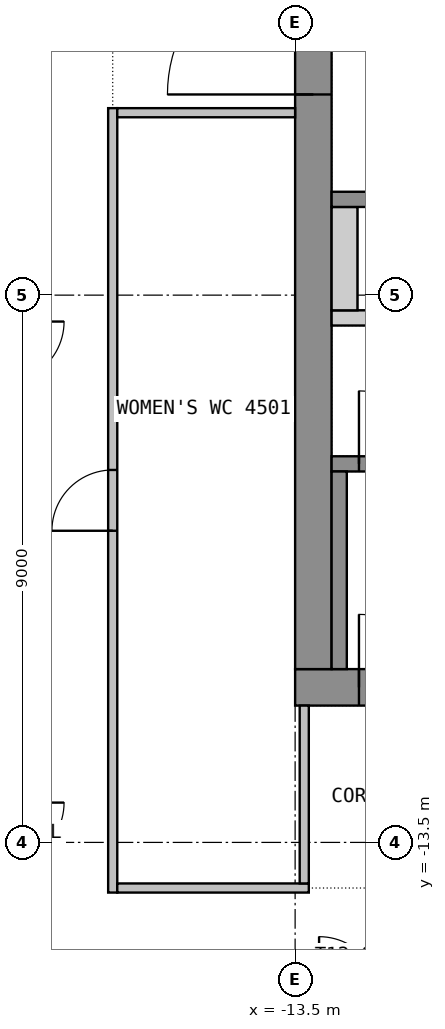
"""IFC4 building model, lengths in metres.
Left out: names, types, materials, properties, quantities, classifications, styles, units other than length and angle.
Written with IfcOpenShell. Run it as: python <this file> out.ifc"""

import sys

from ifc_helpers import new_model, si_unit, direction, frame, frame_2d, origin, place, context, subcontext, project, spatial, polyline, rectangle, outline, extrude, element, fill, save


model = new_model("IFC4")
c1 = context("Model", 3, precision=1e-05, world=origin(), true_north=direction((0.0, 1.0)))
c2 = subcontext(c1, "Body", "Model", "MODEL_VIEW")
j1 = project(units=[si_unit("LENGTHUNIT", "METRE"), si_unit("PLANEANGLEUNIT", "RADIAN")], contexts=[c1])
p1 = place(None, origin())
s1 = spatial("IfcSite", under=j1, at=p1, CompositionType="ELEMENT")
p2 = place(p1, origin())
s2 = spatial("IfcBuilding", under=s1, at=p2, CompositionType="ELEMENT")
p3 = place(p2, frame((0.0, 0.0, 183.9)))
s3 = spatial("IfcBuildingStorey", under=s2, at=p3, CompositionType="ELEMENT", Elevation=183.9)
p4 = place(p3, frame((-13.5, -10.95, 0.0), z_axis=(0.0, 0.0, 1.0), x_axis=(1.0, 0.0, 0.0)))
e1 = element("IfcWall", 1, at=p4, inside=s3, PredefinedType="SHEAR", context=c2, shape_type="SweptSolid", body=[
    extrude(rectangle(XDim=27.0, YDim=0.6, at=frame_2d((13.5, 0.0))), origin(), (0.0, 0.0, 1.0), 3.55),
])
p5 = place(p4, frame((12.3, 0.0, 0.0)))
e2 = element("IfcOpeningElement", 2, at=p5, cuts=e1, PredefinedType="OPENING", context=c2, shape_type="SweptSolid", body=[
    extrude(rectangle(XDim=2.4, YDim=2.1, at=frame_2d((1.2, 1.05))), frame((0.0, 0.31, 0.0), z_axis=(0.0, -1.0, 0.0), x_axis=(1.0, 0.0, 0.0)), (0.0, 0.0, 1.0), 0.62),
])
p6 = place(p4, frame((1.05, 0.0, 0.0)))
e3 = element("IfcOpeningElement", 3, at=p6, cuts=e1, PredefinedType="OPENING", context=c2, shape_type="SweptSolid", body=[
    extrude(rectangle(XDim=1.2, YDim=2.1, at=frame_2d((0.6, 1.05))), frame((0.0, 0.31, 0.0), z_axis=(0.0, -1.0, 0.0), x_axis=(1.0, 0.0, 0.0)), (0.0, 0.0, 1.0), 0.62),
])
p7 = place(p4, frame((24.75, 0.0, 0.0)))
e4 = element("IfcOpeningElement", 4, at=p7, cuts=e1, PredefinedType="OPENING", context=c2, shape_type="SweptSolid", body=[
    extrude(rectangle(XDim=1.2, YDim=2.1, at=frame_2d((0.6, 1.05))), frame((0.0, 0.31, 0.0), z_axis=(0.0, -1.0, 0.0), x_axis=(1.0, 0.0, 0.0)), (0.0, 0.0, 1.0), 0.62),
])
p8 = place(p3, frame((-13.2, -10.65, 0.0), z_axis=(0.0, 0.0, 1.0), x_axis=(0.0, 1.0, 0.0)))
e5 = element("IfcWall", 5, at=p8, inside=s3, PredefinedType="SHEAR", context=c2, shape_type="SweptSolid", body=[
    extrude(rectangle(XDim=21.3, YDim=0.6, at=frame_2d((10.65, 0.0))), origin(), (0.0, 0.0, 1.0), 3.55),
])
p9 = place(p8, frame((9.45, 0.0, 0.0)))
e6 = element("IfcOpeningElement", 6, at=p9, cuts=e5, PredefinedType="OPENING", context=c2, shape_type="SweptSolid", body=[
    extrude(rectangle(XDim=2.4, YDim=2.1, at=frame_2d((1.2, 1.05))), frame((0.0, 0.31, 0.0), z_axis=(0.0, -1.0, 0.0), x_axis=(1.0, 0.0, 0.0)), (0.0, 0.0, 1.0), 0.62),
])
p10 = place(p3, origin())
e7 = element("IfcWall", 7, at=p10, inside=s3, PredefinedType="SHEAR", context=c2, shape_type="SweptSolid", body=[
    extrude(outline(polyline([(-12.9, -5.0), (-4.075, -5.0), (-4.075, -4.75), (-12.9, -4.75), (-12.9, -5.0)])), origin(), (0.0, 0.0, 1.0), 3.55),
])
p11 = place(p3, origin())
e8 = element("IfcWall", 8, at=p11, inside=s3, PredefinedType="SHEAR", context=c2, shape_type="SweptSolid", body=[
    extrude(outline(polyline([(-12.9, -4.75), (-12.475, -4.75), (-12.475, -3.05), (-12.9, -3.05), (-12.9, -4.75)])), origin(), (0.0, 0.0, 1.0), 3.55),
])
p12 = place(p3, frame((-12.9, -2.925, 0.0), z_axis=(0.0, 0.0, 1.0), x_axis=(1.0, 0.0, 0.0)))
e9 = element("IfcWall", 9, at=p12, inside=s3, PredefinedType="SHEAR", context=c2, shape_type="SweptSolid", body=[
    extrude(rectangle(XDim=8.825, YDim=0.25, at=frame_2d((4.413, 0.0))), origin(), (0.0, 0.0, 1.0), 3.55),
])
p13 = place(p12, frame((1.1, 0.0, 0.0)))
e10 = element("IfcOpeningElement", 10, at=p13, cuts=e9, PredefinedType="OPENING", context=c2, shape_type="SweptSolid", body=[
    extrude(rectangle(XDim=1.2, YDim=2.1, at=frame_2d((0.6, 1.05))), frame((0.0, 0.135, 0.0), z_axis=(0.0, -1.0, 0.0), x_axis=(1.0, 0.0, 0.0)), (0.0, 0.0, 1.0), 0.27),
])
p14 = place(p12, frame((3.9, 0.0, 0.0)))
e11 = element("IfcOpeningElement", 11, at=p14, cuts=e9, PredefinedType="OPENING", context=c2, shape_type="SweptSolid", body=[
    extrude(rectangle(XDim=1.2, YDim=2.1, at=frame_2d((0.6, 1.05))), frame((0.0, 0.135, 0.0), z_axis=(0.0, -1.0, 0.0), x_axis=(1.0, 0.0, 0.0)), (0.0, 0.0, 1.0), 0.27),
])
p15 = place(p12, frame((6.7, 0.0, 0.0)))
e12 = element("IfcOpeningElement", 12, at=p15, cuts=e9, PredefinedType="OPENING", context=c2, shape_type="SweptSolid", body=[
    extrude(rectangle(XDim=1.2, YDim=2.1, at=frame_2d((0.6, 1.05))), frame((0.0, 0.135, 0.0), z_axis=(0.0, -1.0, 0.0), x_axis=(1.0, 0.0, 0.0)), (0.0, 0.0, 1.0), 0.27),
])
p16 = place(p3, frame((-12.9, -7.275, 0.0), z_axis=(0.0, 0.0, 1.0), x_axis=(1.0, 0.0, 0.0)))
e13 = element("IfcWall", 13, at=p16, inside=s3, PredefinedType="SHEAR", context=c2, shape_type="SweptSolid", body=[
    extrude(rectangle(XDim=10.1, YDim=0.25, at=frame_2d((5.05, 0.0))), origin(), (0.0, 0.0, 1.0), 3.55),
])
p17 = place(p16, frame((0.45, 0.0, 0.0)))
e14 = element("IfcOpeningElement", 14, at=p17, cuts=e13, PredefinedType="OPENING", context=c2, shape_type="SweptSolid", body=[
    extrude(rectangle(XDim=1.2, YDim=2.1, at=frame_2d((0.6, 1.05))), frame((0.0, 0.135, 0.0), z_axis=(0.0, -1.0, 0.0), x_axis=(1.0, 0.0, 0.0)), (0.0, 0.0, 1.0), 0.27),
])
p18 = place(p3, frame((-12.775, -10.65, 0.0), z_axis=(0.0, 0.0, 1.0), x_axis=(0.0, 1.0, 0.0)))
e15 = element("IfcWall", 15, at=p18, inside=s3, PredefinedType="SHEAR", context=c2, shape_type="SweptSolid", body=[
    extrude(rectangle(XDim=3.25, YDim=0.25, at=frame_2d((1.625, 0.0))), origin(), (0.0, 0.0, 1.0), 3.55),
])
p19 = place(p3, frame((-16.5, -14.325, 0.0), z_axis=(0.0, 0.0, 1.0), x_axis=(0.0, 1.0, 0.0)))
e16 = element("IfcWall", 16, at=p19, inside=s3, PredefinedType="PARTITIONING", context=c2, shape_type="SweptSolid", body=[
    extrude(rectangle(XDim=12.9, YDim=0.15, at=frame_2d((6.45, 0.0))), origin(), (0.0, 0.0, 1.0), 3.55),
])
p20 = place(p19, frame((5.95, 0.0, 0.0)))
e17 = element("IfcOpeningElement", 17, at=p20, cuts=e16, PredefinedType="OPENING", context=c2, shape_type="SweptSolid", body=[
    extrude(rectangle(XDim=1.0, YDim=2.1, at=frame_2d((0.5, 1.05))), frame((0.0, 0.085, 0.0), z_axis=(0.0, -1.0, 0.0), x_axis=(1.0, 0.0, 0.0)), (0.0, 0.0, 1.0), 0.17),
])
p21 = place(p3, frame((-13.275, -14.25, 0.0), z_axis=(0.0, 0.0, 1.0), x_axis=(-1.0, 0.0, 0.0)))
e18 = element("IfcWall", 18, at=p21, inside=s3, PredefinedType="PARTITIONING", context=c2, shape_type="SweptSolid", body=[
    extrude(rectangle(XDim=3.15, YDim=0.15, at=frame_2d((1.575, 0.0))), origin(), (0.0, 0.0, 1.0), 3.55),
])
for number, where, z_axis, x_axis in (
    (19, (-16.425, -1.5, 0.0), (0.0, 0.0, 1.0), (1.0, 0.0, 0.0)),
    (20, (-13.35, -11.25, 0.0), (0.0, 0.0, 1.0), (0.0, -1.0, 0.0)),
):
    element("IfcWall", number, at=place(p3, frame(where, z_axis=z_axis, x_axis=x_axis)), inside=s3, PredefinedType="PARTITIONING", context=c2, shape_type="SweptSolid", body=[
        extrude(rectangle(XDim=2.925, YDim=0.15, at=frame_2d((1.462, 0.0))), origin(), (0.0, 0.0, 1.0), 3.55),
    ])
p22 = place(p9, origin())
e21 = element("IfcDoor", 21, at=p22, inside=s3, OperationType="DOUBLE_DOOR_DOUBLE_SWING", PredefinedType="DOOR", context=c2, shape_type="SweptSolid", body=[
    extrude(rectangle(XDim=2.4, YDim=2.1, at=frame_2d((1.2, 1.05))), frame((0.0, 0.025, 0.0), z_axis=(0.0, -1.0, 0.0), x_axis=(1.0, 0.0, 0.0)), (0.0, 0.0, 1.0), 0.05),
])
fill(e6, e21)
p23 = place(p6, origin())
e22 = element("IfcDoor", 22, at=p23, inside=s3, OperationType="SINGLE_SWING_RIGHT", PredefinedType="DOOR", context=c2, shape_type="SweptSolid", body=[
    extrude(rectangle(XDim=1.2, YDim=2.1, at=frame_2d((0.6, 1.05))), frame((0.0, 0.025, 0.0), z_axis=(0.0, -1.0, 0.0), x_axis=(1.0, 0.0, 0.0)), (0.0, 0.0, 1.0), 0.05),
])
fill(e3, e22)
p24 = place(p17, origin())
e23 = element("IfcDoor", 23, at=p24, inside=s3, OperationType="SINGLE_SWING_LEFT", PredefinedType="DOOR", context=c2, shape_type="SweptSolid", body=[
    extrude(rectangle(XDim=1.2, YDim=2.1, at=frame_2d((0.6, 1.05))), frame((0.0, 0.025, 0.0), z_axis=(0.0, -1.0, 0.0), x_axis=(1.0, 0.0, 0.0)), (0.0, 0.0, 1.0), 0.05),
])
fill(e14, e23)
p25 = place(p20, origin())
e24 = element("IfcDoor", 24, at=p25, inside=s3, OperationType="SINGLE_SWING_LEFT", PredefinedType="DOOR", context=c2, shape_type="SweptSolid", body=[
    extrude(rectangle(XDim=1.0, YDim=2.1, at=frame_2d((0.5, 1.05))), frame((0.0, 0.025, 0.0), z_axis=(0.0, -1.0, 0.0), x_axis=(1.0, 0.0, 0.0)), (0.0, 0.0, 1.0), 0.05),
])
fill(e17, e24)
save(model, sys.argv[1])
